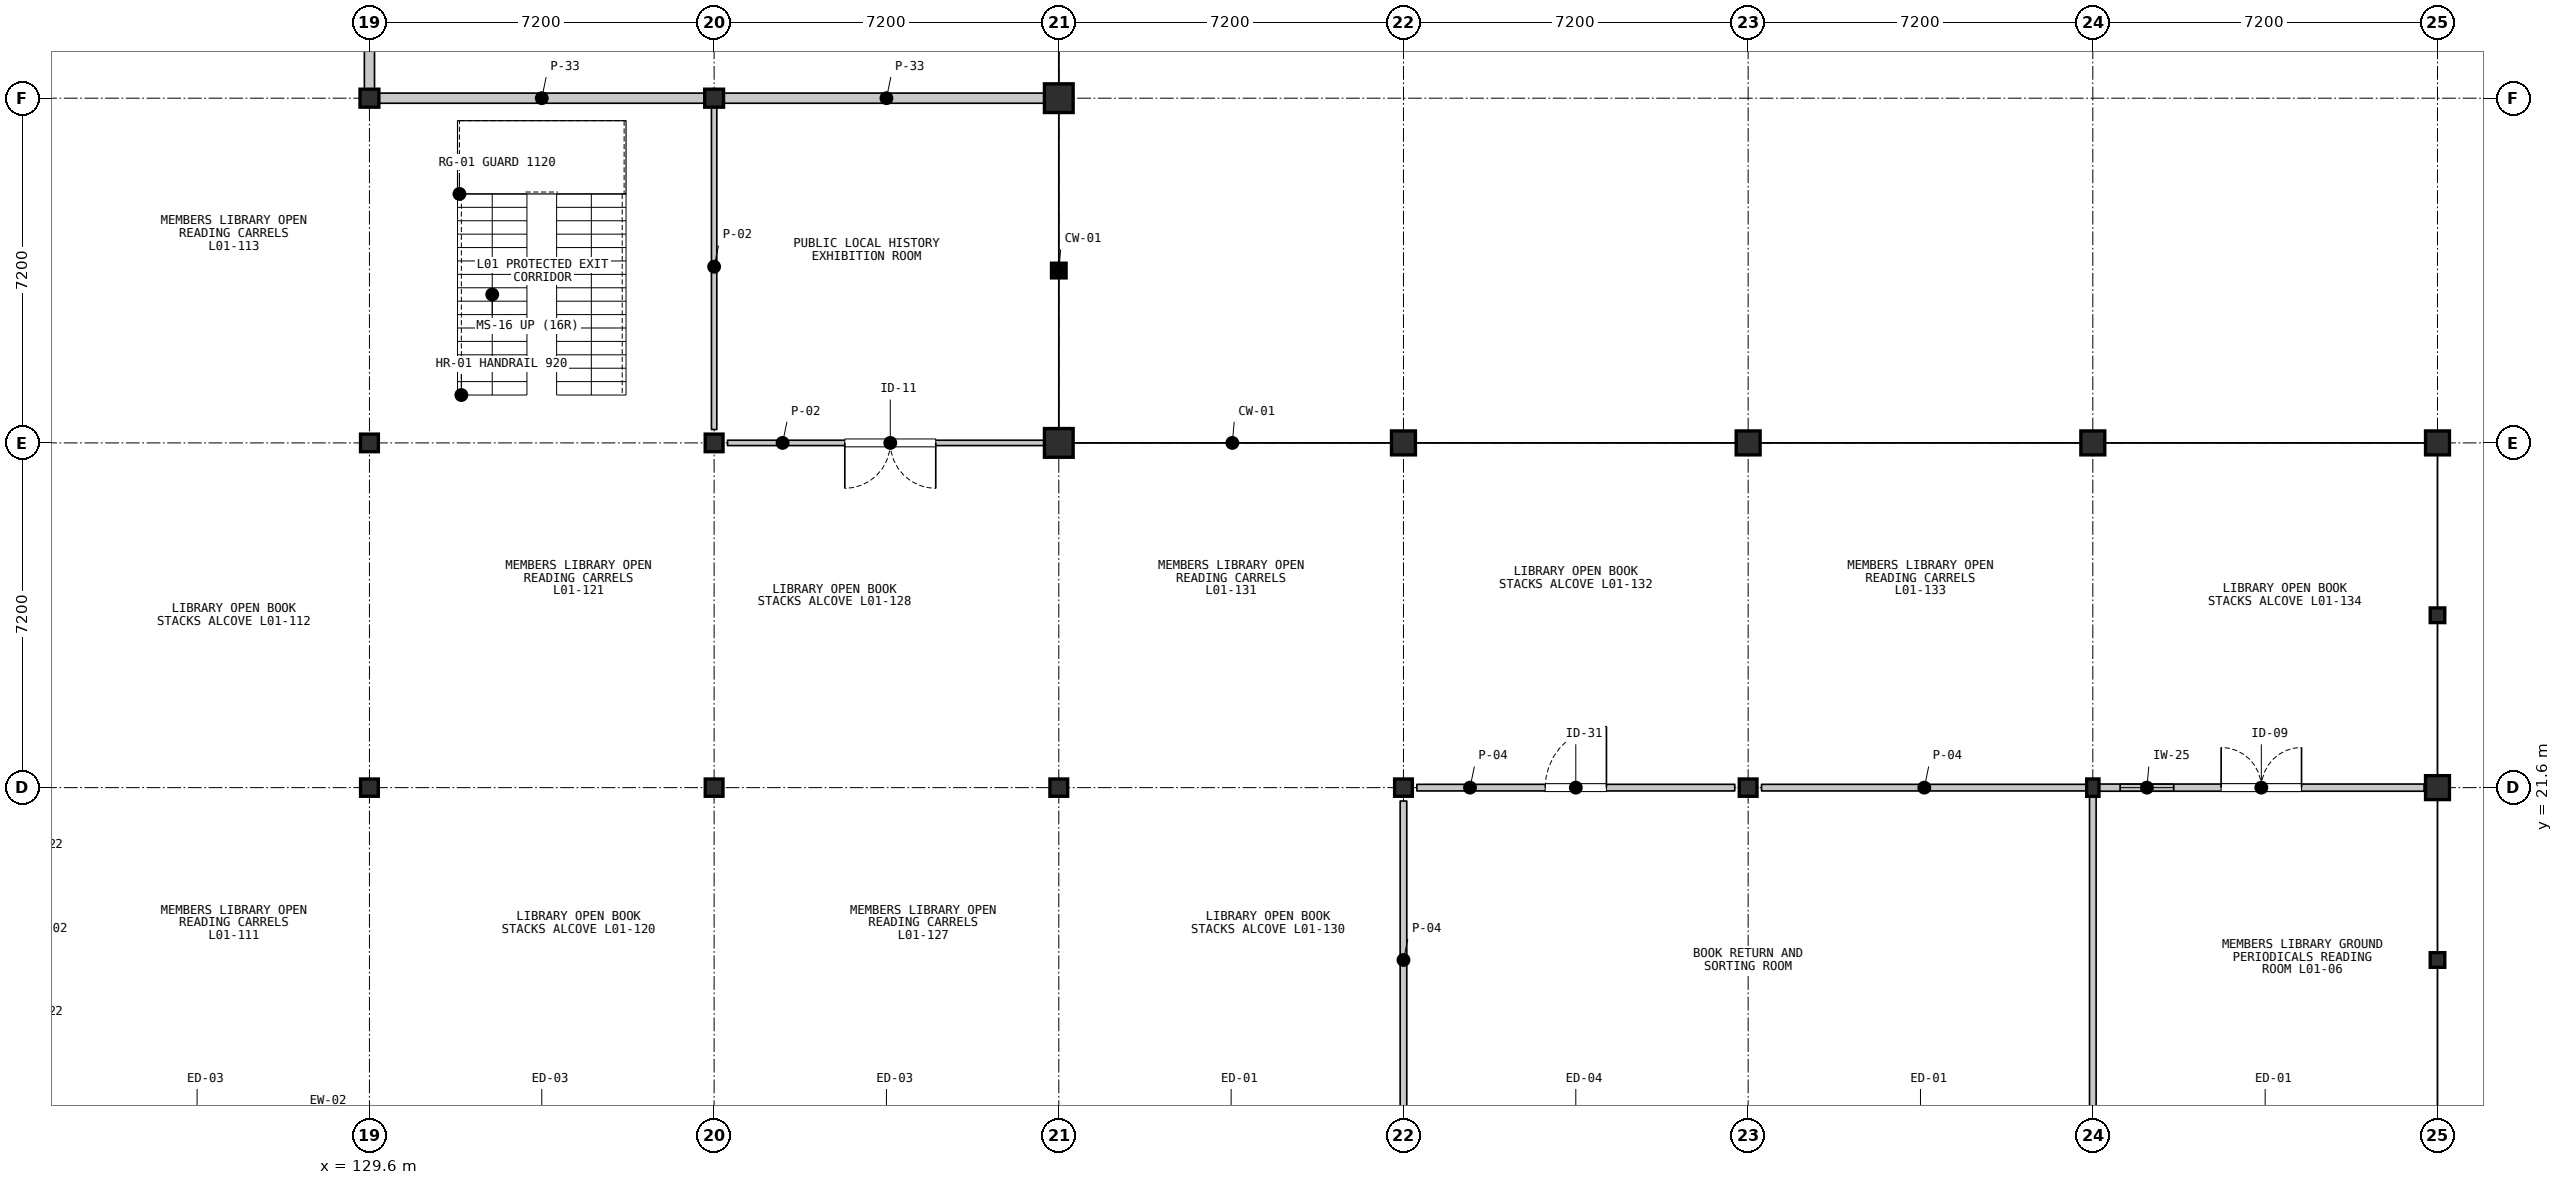
"""IFC4 building model, lengths in metres.
Left out: names, types, materials, properties, quantities, classifications, styles, units other than length and angle.
Written with IfcOpenShell. Run it as: python <this file> out.ifc"""

import sys

from ifc_helpers import new_model, si_unit, direction, frame, frame_2d, origin, origin_2d, place, context, subcontext, project, spatial, rectangle, i_section, extrude, element, fill, save


model = new_model("IFC4")
c1 = context("Model", 3, precision=1e-05, world=origin(), true_north=direction((0.0, 1.0)))
c2 = subcontext(c1, "Body", "Model", "MODEL_VIEW")
j1 = project(units=[si_unit("LENGTHUNIT", "METRE"), si_unit("PLANEANGLEUNIT", "RADIAN")], contexts=[c1])
p1 = place(None, origin())
s1 = spatial("IfcSite", under=j1, at=p1, CompositionType="ELEMENT")
p2 = place(p1, origin())
s2 = spatial("IfcBuilding", under=s1, at=p2, CompositionType="ELEMENT")
p3 = place(p2, origin())
s3 = spatial("IfcBuildingStorey", under=s2, at=p3, CompositionType="ELEMENT", Elevation=0.0)
p4 = place(p3, frame((129.6, 21.6, 0.0), z_axis=(0.0, 0.0, 1.0), x_axis=(1.0, 0.0, 0.0)))
e1 = element("IfcColumn", 1, at=p4, inside=s3, PredefinedType="COLUMN", context=c2, shape_type="SweptSolid", body=[
    extrude(i_section(OverallWidth=0.371, OverallDepth=0.361, WebThickness=0.012, FlangeThickness=0.02, FilletRadius=0.015, at=origin_2d()), origin(), (0.0, 0.0, 1.0), 5.4),
])
p5 = place(p3, frame((129.6, 28.8, 0.0), z_axis=(0.0, 0.0, 1.0), x_axis=(1.0, 0.0, 0.0)))
e2 = element("IfcColumn", 2, at=p5, inside=s3, PredefinedType="COLUMN", context=c2, shape_type="SweptSolid", body=[
    extrude(i_section(OverallWidth=0.373, OverallDepth=0.368, WebThickness=0.015, FlangeThickness=0.024, FilletRadius=0.015, at=origin_2d()), origin(), (0.0, 0.0, 1.0), 5.4),
])
p6 = place(p3, frame((129.6, 36.0, 0.0), z_axis=(0.0, 0.0, 1.0), x_axis=(1.0, 0.0, 0.0)))
e3 = element("IfcColumn", 3, at=p6, inside=s3, PredefinedType="COLUMN", context=c2, shape_type="SweptSolid", body=[
    extrude(i_section(OverallWidth=0.394, OverallDepth=0.376, WebThickness=0.017, FlangeThickness=0.028, FilletRadius=0.015, at=origin_2d()), origin(), (0.0, 0.0, 1.0), 5.4),
])
p7 = place(p3, frame((136.8, 21.6, 0.0), z_axis=(0.0, 0.0, 1.0), x_axis=(1.0, 0.0, 0.0)))
e4 = element("IfcColumn", 4, at=p7, inside=s3, PredefinedType="COLUMN", context=c2, shape_type="SweptSolid", body=[
    extrude(i_section(OverallWidth=0.371, OverallDepth=0.361, WebThickness=0.012, FlangeThickness=0.02, FilletRadius=0.015, at=origin_2d()), origin(), (0.0, 0.0, 1.0), 5.4),
])
p8 = place(p3, frame((136.8, 28.8, 0.0), z_axis=(0.0, 0.0, 1.0), x_axis=(1.0, 0.0, 0.0)))
e5 = element("IfcColumn", 5, at=p8, inside=s3, PredefinedType="COLUMN", context=c2, shape_type="SweptSolid", body=[
    extrude(i_section(OverallWidth=0.373, OverallDepth=0.368, WebThickness=0.015, FlangeThickness=0.024, FilletRadius=0.015, at=origin_2d()), origin(), (0.0, 0.0, 1.0), 5.4),
])
p9 = place(p3, frame((136.8, 36.0, 0.0), z_axis=(0.0, 0.0, 1.0), x_axis=(1.0, 0.0, 0.0)))
e6 = element("IfcColumn", 6, at=p9, inside=s3, PredefinedType="COLUMN", context=c2, shape_type="SweptSolid", body=[
    extrude(i_section(OverallWidth=0.394, OverallDepth=0.376, WebThickness=0.017, FlangeThickness=0.028, FilletRadius=0.015, at=origin_2d()), origin(), (0.0, 0.0, 1.0), 5.4),
])
p10 = place(p3, frame((144.0, 21.6, 0.0), z_axis=(0.0, 0.0, 1.0), x_axis=(1.0, 0.0, 0.0)))
e7 = element("IfcColumn", 7, at=p10, inside=s3, PredefinedType="COLUMN", context=c2, shape_type="SweptSolid", body=[
    extrude(i_section(OverallWidth=0.371, OverallDepth=0.361, WebThickness=0.012, FlangeThickness=0.02, FilletRadius=0.015, at=origin_2d()), origin(), (0.0, 0.0, 1.0), 5.4),
])
for number, where, z_axis, x_axis in (
    (8, (144.0, 28.8, 0.0), (0.0, 0.0, 1.0), (1.0, 0.0, 0.0)),
    (9, (144.0, 36.0, 0.0), (0.0, 0.0, 1.0), (1.0, 0.0, 0.0)),
):
    element("IfcColumn", number, at=place(p3, frame(where, z_axis=z_axis, x_axis=x_axis)), inside=s3, PredefinedType="COLUMN", context=c2, shape_type="SweptSolid", body=[
        extrude(rectangle(XDim=0.6, YDim=0.6, at=origin_2d()), origin(), (0.0, 0.0, 1.0), 5.4),
    ])
p11 = place(p3, frame((151.2, 21.6, 0.0), z_axis=(0.0, 0.0, 1.0), x_axis=(1.0, 0.0, 0.0)))
e10 = element("IfcColumn", 10, at=p11, inside=s3, PredefinedType="COLUMN", context=c2, shape_type="SweptSolid", body=[
    extrude(i_section(OverallWidth=0.371, OverallDepth=0.361, WebThickness=0.012, FlangeThickness=0.02, FilletRadius=0.015, at=origin_2d()), origin(), (0.0, 0.0, 1.0), 5.4),
])
p12 = place(p3, frame((151.2, 28.8, 0.0), z_axis=(0.0, 0.0, 1.0), x_axis=(1.0, 0.0, 0.0)))
e11 = element("IfcColumn", 11, at=p12, inside=s3, PredefinedType="COLUMN", context=c2, shape_type="SweptSolid", body=[
    extrude(rectangle(XDim=0.5, YDim=0.5, at=origin_2d()), origin(), (0.0, 0.0, 1.0), 5.4),
])
p13 = place(p3, frame((158.4, 21.6, 0.0), z_axis=(0.0, 0.0, 1.0), x_axis=(1.0, 0.0, 0.0)))
e12 = element("IfcColumn", 12, at=p13, inside=s3, PredefinedType="COLUMN", context=c2, shape_type="SweptSolid", body=[
    extrude(i_section(OverallWidth=0.371, OverallDepth=0.361, WebThickness=0.012, FlangeThickness=0.02, FilletRadius=0.015, at=origin_2d()), origin(), (0.0, 0.0, 1.0), 5.4),
])
p14 = place(p3, frame((158.4, 28.8, 0.0), z_axis=(0.0, 0.0, 1.0), x_axis=(1.0, 0.0, 0.0)))
e13 = element("IfcColumn", 13, at=p14, inside=s3, PredefinedType="COLUMN", context=c2, shape_type="SweptSolid", body=[
    extrude(rectangle(XDim=0.5, YDim=0.5, at=origin_2d()), origin(), (0.0, 0.0, 1.0), 5.4),
])
p15 = place(p3, frame((165.6, 21.6, 0.0), z_axis=(0.0, 0.0, 1.0), x_axis=(1.0, 0.0, 0.0)))
e14 = element("IfcColumn", 14, at=p15, inside=s3, PredefinedType="COLUMN", context=c2, shape_type="SweptSolid", body=[
    extrude(i_section(OverallWidth=0.257, OverallDepth=0.363, WebThickness=0.013, FlangeThickness=0.022, FilletRadius=0.015, at=origin_2d()), origin(), (0.0, 0.0, 1.0), 5.4),
])
for number, where, z_axis, x_axis in (
    (15, (165.6, 28.8, 0.0), (0.0, 0.0, 1.0), (1.0, 0.0, 0.0)),
    (16, (172.8, 21.6, 0.0), (0.0, 0.0, 1.0), (1.0, 0.0, 0.0)),
    (17, (172.8, 28.8, 0.0), (0.0, 0.0, 1.0), (1.0, 0.0, 0.0)),
):
    element("IfcColumn", number, at=place(p3, frame(where, z_axis=z_axis, x_axis=x_axis)), inside=s3, PredefinedType="COLUMN", context=c2, shape_type="SweptSolid", body=[
        extrude(rectangle(XDim=0.5, YDim=0.5, at=origin_2d()), origin(), (0.0, 0.0, 1.0), 5.4),
    ])
for number, where, z_axis, x_axis in (
    (18, (172.8, 18.0, 0.0), (0.0, 0.0, 1.0), (1.0, 0.0, 0.0)),
    (19, (172.8, 25.2, 0.0), (0.0, 0.0, 1.0), (1.0, 0.0, 0.0)),
    (20, (144.0, 32.4, 0.0), (0.0, 0.0, 1.0), (1.0, 0.0, 0.0)),
):
    element("IfcColumn", number, at=place(p3, frame(where, z_axis=z_axis, x_axis=x_axis)), inside=s3, PredefinedType="PILASTER", context=c2, shape_type="SweptSolid", body=[
        extrude(i_section(OverallWidth=0.305, OverallDepth=0.307, WebThickness=0.01, FlangeThickness=0.015, FilletRadius=0.015, at=origin_2d()), origin(), (0.0, 0.0, 1.0), 5.4),
    ])
for number, where, z_axis, x_axis in (
    (21, (136.68, 36.0, 0.0), (0.0, 0.0, 1.0), (-1.0, 0.0, 0.0)),
    (22, (143.88, 36.0, 0.0), (0.0, 0.0, 1.0), (-1.0, 0.0, 0.0)),
):
    element("IfcWall", number, at=place(p3, frame(where, z_axis=z_axis, x_axis=x_axis)), inside=s3, PredefinedType="PARTITIONING", context=c2, shape_type="SweptSolid", body=[
        extrude(rectangle(XDim=6.96, YDim=0.212, at=frame_2d((3.48, 0.0))), origin(), (0.0, 0.0, 1.0), 2.035),
    ])
p16 = place(p3, frame((129.6, 36.12, 0.0), z_axis=(0.0, 0.0, 1.0), x_axis=(0.0, 1.0, 0.0)))
e23 = element("IfcWall", 23, at=p16, inside=s3, PredefinedType="PARTITIONING", context=c2, shape_type="SweptSolid", body=[
    extrude(rectangle(XDim=6.96, YDim=0.212, at=frame_2d((3.48, 0.0))), origin(), (0.0, 0.0, 1.0), 4.428),
])
p17 = place(p3, frame((143.88, 28.8, 0.0), z_axis=(0.0, 0.0, 1.0), x_axis=(-1.0, 0.0, 0.0)))
e24 = element("IfcWall", 24, at=p17, inside=s3, PredefinedType="PARTITIONING", context=c2, shape_type="SweptSolid", body=[
    extrude(rectangle(XDim=6.8, YDim=0.112, at=frame_2d((3.4, 0.0))), origin(), (0.0, 0.0, 1.0), 4.588),
])
p18 = place(p17, frame((2.45, 0.0, 0.0)))
e25 = element("IfcOpeningElement", 25, at=p18, cuts=e24, PredefinedType="OPENING", context=c2, shape_type="SweptSolid", body=[
    extrude(rectangle(XDim=1.9, YDim=2.45, at=frame_2d((0.95, 1.225))), frame((0.0, 0.066, 0.0), z_axis=(0.0, -1.0, 0.0), x_axis=(1.0, 0.0, 0.0)), (0.0, 0.0, 1.0), 0.132),
])
p19 = place(p3, frame((136.8, 29.08, 0.0), z_axis=(0.0, 0.0, 1.0), x_axis=(0.0, 1.0, 0.0)))
e26 = element("IfcWall", 26, at=p19, inside=s3, PredefinedType="PARTITIONING", context=c2, shape_type="SweptSolid", body=[
    extrude(rectangle(XDim=6.8, YDim=0.112, at=frame_2d((3.4, 0.0))), origin(), (0.0, 0.0, 1.0), 2.035),
])
p20 = place(p3, frame((151.48, 21.6, 0.0), z_axis=(0.0, 0.0, 1.0), x_axis=(1.0, 0.0, 0.0)))
e27 = element("IfcWall", 27, at=p20, inside=s3, PredefinedType="PARTITIONING", context=c2, shape_type="SweptSolid", body=[
    extrude(rectangle(XDim=6.64, YDim=0.138, at=frame_2d((3.32, 0.0))), origin(), (0.0, 0.0, 1.0), 4.588),
])
p21 = place(p20, frame((2.68, 0.0, 0.0)))
e28 = element("IfcOpeningElement", 28, at=p21, cuts=e27, PredefinedType="OPENING", context=c2, shape_type="SweptSolid", body=[
    extrude(rectangle(XDim=1.28, YDim=2.22, at=frame_2d((0.64, 1.11))), frame((0.0, 0.079, 0.0), z_axis=(0.0, -1.0, 0.0), x_axis=(1.0, 0.0, 0.0)), (0.0, 0.0, 1.0), 0.158),
])
p22 = place(p3, frame((158.68, 21.6, 0.0), z_axis=(0.0, 0.0, 1.0), x_axis=(1.0, 0.0, 0.0)))
e29 = element("IfcWall", 29, at=p22, inside=s3, PredefinedType="PARTITIONING", context=c2, shape_type="SweptSolid", body=[
    extrude(rectangle(XDim=6.8, YDim=0.138, at=frame_2d((3.4, 0.0))), origin(), (0.0, 0.0, 1.0), 4.588),
])
p23 = place(p3, frame((151.2, 14.68, 0.0), z_axis=(0.0, 0.0, 1.0), x_axis=(0.0, 1.0, 0.0)))
e30 = element("IfcWall", 30, at=p23, inside=s3, PredefinedType="PARTITIONING", context=c2, shape_type="SweptSolid", body=[
    extrude(rectangle(XDim=6.64, YDim=0.138, at=frame_2d((3.32, 0.0))), origin(), (0.0, 0.0, 1.0), 4.657),
])
p24 = place(p3, frame((165.6, 21.48, 0.0), z_axis=(0.0, 0.0, 1.0), x_axis=(0.0, -1.0, 0.0)))
e31 = element("IfcWall", 31, at=p24, inside=s3, PredefinedType="PARTITIONING", context=c2, shape_type="SweptSolid", body=[
    extrude(rectangle(XDim=6.96, YDim=0.138, at=frame_2d((3.48, 0.0))), origin(), (0.0, 0.0, 1.0), 4.588),
])
p25 = place(p3, frame((165.72, 21.6, 0.0), z_axis=(0.0, 0.0, 1.0), x_axis=(1.0, 0.0, 0.0)))
e32 = element("IfcWall", 32, at=p25, inside=s3, PredefinedType="PARTITIONING", context=c2, shape_type="SweptSolid", body=[
    extrude(rectangle(XDim=6.8, YDim=0.15, at=frame_2d((3.4, 0.0))), origin(), (0.0, 0.0, 1.0), 4.588),
])
p26 = place(p25, frame((2.56, 0.0, 0.0)))
e33 = element("IfcOpeningElement", 33, at=p26, cuts=e32, PredefinedType="OPENING", context=c2, shape_type="SweptSolid", body=[
    extrude(rectangle(XDim=1.68, YDim=2.35, at=frame_2d((0.84, 1.175))), frame((0.0, 0.085, 0.0), z_axis=(0.0, -1.0, 0.0), x_axis=(1.0, 0.0, 0.0)), (0.0, 0.0, 1.0), 0.17),
])
p27 = place(p25, frame((0.45, 0.0, 1.05)))
e34 = element("IfcOpeningElement", 34, at=p27, cuts=e32, PredefinedType="OPENING", context=c2, shape_type="SweptSolid", body=[
    extrude(rectangle(XDim=1.12, YDim=0.92, at=frame_2d((0.56, 0.46))), frame((0.0, 0.085, 0.0), z_axis=(0.0, -1.0, 0.0), x_axis=(1.0, 0.0, 0.0)), (0.0, 0.0, 1.0), 0.17),
])
p28 = place(p18, origin())
e35 = element("IfcDoor", 35, at=p28, inside=s3, OperationType="DOUBLE_DOOR_SINGLE_SWING", PredefinedType="DOOR", context=c2, shape_type="SweptSolid", body=[
    extrude(rectangle(XDim=1.9, YDim=2.45, at=frame_2d((0.95, 1.225))), frame((0.0, 0.025, 0.0), z_axis=(0.0, -1.0, 0.0), x_axis=(1.0, 0.0, 0.0)), (0.0, 0.0, 1.0), 0.05),
])
fill(e25, e35)
p29 = place(p21, origin())
e36 = element("IfcDoor", 36, at=p29, inside=s3, OperationType="SINGLE_SWING_RIGHT", PredefinedType="DOOR", context=c2, shape_type="SweptSolid", body=[
    extrude(rectangle(XDim=1.28, YDim=2.22, at=frame_2d((0.64, 1.11))), frame((0.0, 0.025, 0.0), z_axis=(0.0, -1.0, 0.0), x_axis=(1.0, 0.0, 0.0)), (0.0, 0.0, 1.0), 0.05),
])
fill(e28, e36)
p30 = place(p26, origin())
e37 = element("IfcDoor", 37, at=p30, inside=s3, OperationType="DOUBLE_DOOR_SINGLE_SWING", PredefinedType="DOOR", context=c2, shape_type="SweptSolid", body=[
    extrude(rectangle(XDim=1.68, YDim=2.35, at=frame_2d((0.84, 1.175))), frame((0.0, 0.025, 0.0), z_axis=(0.0, -1.0, 0.0), x_axis=(1.0, 0.0, 0.0)), (0.0, 0.0, 1.0), 0.05),
])
fill(e33, e37)
p31 = place(p27, origin())
e38 = element("IfcWindow", 38, at=p31, inside=s3, PartitioningType="SINGLE_PANEL", PredefinedType="WINDOW", context=c2, shape_type="SweptSolid", body=[
    extrude(rectangle(XDim=1.12, YDim=0.92, at=frame_2d((0.56, 0.46))), frame((0.0, 0.03, 0.0), z_axis=(0.0, -1.0, 0.0), x_axis=(1.0, 0.0, 0.0)), (0.0, 0.0, 1.0), 0.06),
])
fill(e34, e38)
save(model, sys.argv[1])
